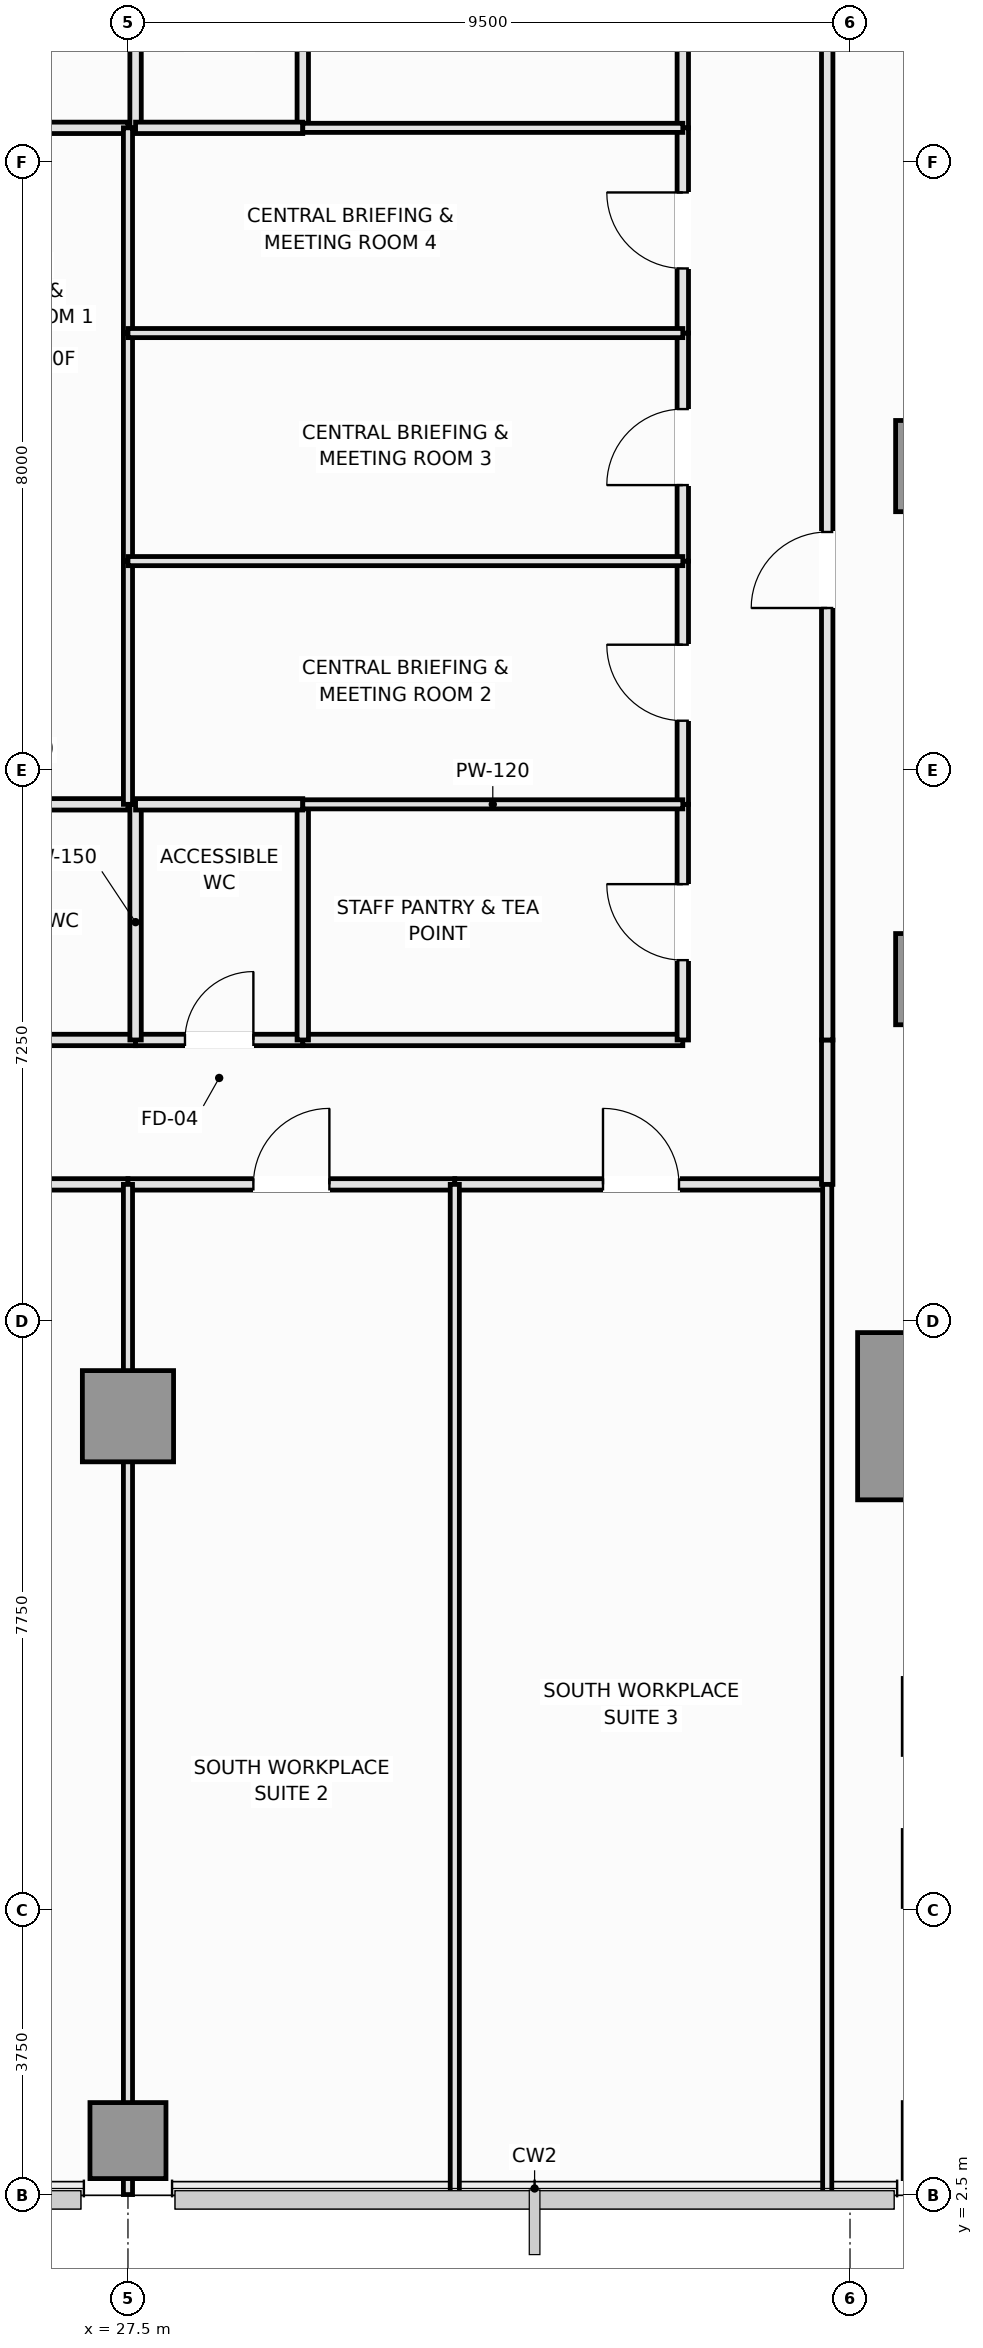
"""IFC4 building model, lengths in metres.
Left out: names, types, materials, properties, quantities, classifications, styles, units other than length and angle.
Written with IfcOpenShell. Run it as: python <this file> out.ifc"""

import sys

from ifc_helpers import new_model, si_unit, direction, frame, frame_2d, origin, origin_2d, place, context, subcontext, project, spatial, rectangle, extrude, element, fill, save


model = new_model("IFC4")
c1 = context("Model", 3, precision=1e-05, world=origin(), true_north=direction((0.0, 1.0)))
c2 = subcontext(c1, "Body", "Model", "MODEL_VIEW")
j1 = project(units=[si_unit("LENGTHUNIT", "METRE"), si_unit("PLANEANGLEUNIT", "RADIAN")], contexts=[c1])
p1 = place(None, origin())
s1 = spatial("IfcSite", under=j1, at=p1, CompositionType="ELEMENT")
p2 = place(p1, origin())
s2 = spatial("IfcBuilding", under=s1, at=p2, CompositionType="ELEMENT")
p3 = place(p2, frame((0.0, 0.0, 75.3)))
s3 = spatial("IfcBuildingStorey", under=s2, at=p3, CompositionType="ELEMENT", Elevation=75.3)
p4 = place(p3, frame((38.2, 12.75, 0.0), z_axis=(0.0, 0.0, 1.0), x_axis=(1.0, 0.0, 0.0)))
e1 = element("IfcColumn", 1, at=p4, inside=s3, PredefinedType="COLUMN", context=c2, shape_type="SweptSolid", body=[
    extrude(rectangle(XDim=2.2, YDim=2.2, at=origin_2d()), origin(), (0.0, 0.0, 1.0), 3.55),
])
for number, where, z_axis, x_axis in (
    (2, (27.5, 12.75, 0.0), (0.0, 0.0, 1.0), (1.0, 0.0, 0.0)),
    (3, (38.2, 18.5, 0.0), (0.0, 0.0, 1.0), (1.0, 0.0, 0.0)),
    (4, (38.2, 25.25, 0.0), (0.0, 0.0, 1.0), (1.0, 0.0, 0.0)),
):
    element("IfcColumn", number, at=place(p3, frame(where, z_axis=z_axis, x_axis=x_axis)), inside=s3, PredefinedType="COLUMN", context=c2, shape_type="SweptSolid", body=[
        extrude(rectangle(XDim=1.2, YDim=1.2, at=origin_2d()), origin(), (0.0, 0.0, 1.0), 3.55),
    ])
p5 = place(p3, frame((27.5, 3.22, 0.0), z_axis=(0.0, 0.0, 1.0), x_axis=(1.0, 0.0, 0.0)))
e5 = element("IfcColumn", 5, at=p5, inside=s3, PredefinedType="COLUMN", context=c2, shape_type="SweptSolid", body=[
    extrude(rectangle(XDim=1.0, YDim=1.0, at=origin_2d()), origin(), (0.0, 0.0, 1.0), 3.55),
])
p6 = place(p3, frame((24.45, 17.7, 0.0), z_axis=(0.0, 0.0, 1.0), x_axis=(1.0, 0.0, 0.0)))
e6 = element("IfcWall", 6, at=p6, inside=s3, PredefinedType="PLUMBINGWALL", context=c2, shape_type="SweptSolid", body=[
    extrude(rectangle(XDim=3.15, YDim=0.15, at=frame_2d((1.575, 0.0))), origin(), (0.0, 0.0, 1.0), 3.37),
])
p7 = place(p3, frame((27.6, 17.7, 0.0), z_axis=(0.0, 0.0, 1.0), x_axis=(1.0, 0.0, 0.0)))
e7 = element("IfcWall", 7, at=p7, inside=s3, PredefinedType="PLUMBINGWALL", context=c2, shape_type="SweptSolid", body=[
    extrude(rectangle(XDim=2.2, YDim=0.15, at=frame_2d((1.1, 0.0))), origin(), (0.0, 0.0, 1.0), 3.37),
])
p8 = place(p7, frame((0.65, 0.0, 0.0)))
e8 = element("IfcOpeningElement", 8, at=p8, cuts=e7, PredefinedType="OPENING", context=c2, shape_type="SweptSolid", body=[
    extrude(rectangle(XDim=0.9, YDim=2.1, at=frame_2d((0.45, 1.05))), frame((0.0, 0.085, 0.0), z_axis=(0.0, -1.0, 0.0), x_axis=(1.0, 0.0, 0.0)), (0.0, 0.0, 1.0), 0.17),
])
p9 = place(p3, frame((29.8, 17.7, 0.0), z_axis=(0.0, 0.0, 1.0), x_axis=(1.0, 0.0, 0.0)))
e9 = element("IfcWall", 9, at=p9, inside=s3, PredefinedType="PARTITIONING", context=c2, shape_type="SweptSolid", body=[
    extrude(rectangle(XDim=5.0, YDim=0.15, at=frame_2d((2.5, 0.0))), origin(), (0.0, 0.0, 1.0), 3.37),
])
p10 = place(p3, frame((18.0, 15.8, 0.0), z_axis=(0.0, 0.0, 1.0), x_axis=(1.0, 0.0, 0.0)))
e10 = element("IfcWall", 10, at=p10, inside=s3, PredefinedType="PARTITIONING", context=c2, shape_type="SweptSolid", body=[
    extrude(rectangle(XDim=9.5, YDim=0.15, at=frame_2d((4.75, 0.0))), origin(), (0.0, 0.0, 1.0), 3.37),
])
p11 = place(p10, frame((4.25, 0.0, 0.0)))
e11 = element("IfcOpeningElement", 11, at=p11, cuts=e10, PredefinedType="OPENING", context=c2, shape_type="SweptSolid", body=[
    extrude(rectangle(XDim=1.0, YDim=2.15, at=frame_2d((0.5, 1.075))), frame((0.0, 0.085, 0.0), z_axis=(0.0, -1.0, 0.0), x_axis=(1.0, 0.0, 0.0)), (0.0, 0.0, 1.0), 0.17),
])
p12 = place(p3, frame((27.5, 15.8, 0.0), z_axis=(0.0, 0.0, 1.0), x_axis=(1.0, 0.0, 0.0)))
e12 = element("IfcWall", 12, at=p12, inside=s3, PredefinedType="PARTITIONING", context=c2, shape_type="SweptSolid", body=[
    extrude(rectangle(XDim=4.3, YDim=0.15, at=frame_2d((2.15, 0.0))), origin(), (0.0, 0.0, 1.0), 3.37),
])
p13 = place(p12, frame((1.65, 0.0, 0.0)))
e13 = element("IfcOpeningElement", 13, at=p13, cuts=e12, PredefinedType="OPENING", context=c2, shape_type="SweptSolid", body=[
    extrude(rectangle(XDim=1.0, YDim=2.15, at=frame_2d((0.5, 1.075))), frame((0.0, 0.085, 0.0), z_axis=(0.0, -1.0, 0.0), x_axis=(1.0, 0.0, 0.0)), (0.0, 0.0, 1.0), 0.17),
])
p14 = place(p3, frame((31.8, 15.8, 0.0), z_axis=(0.0, 0.0, 1.0), x_axis=(1.0, 0.0, 0.0)))
e14 = element("IfcWall", 14, at=p14, inside=s3, PredefinedType="PARTITIONING", context=c2, shape_type="SweptSolid", body=[
    extrude(rectangle(XDim=4.9, YDim=0.15, at=frame_2d((2.45, 0.0))), origin(), (0.0, 0.0, 1.0), 3.37),
])
p15 = place(p14, frame((1.95, 0.0, 0.0)))
e15 = element("IfcOpeningElement", 15, at=p15, cuts=e14, PredefinedType="OPENING", context=c2, shape_type="SweptSolid", body=[
    extrude(rectangle(XDim=1.0, YDim=2.15, at=frame_2d((0.5, 1.075))), frame((0.0, 0.085, 0.0), z_axis=(0.0, -1.0, 0.0), x_axis=(1.0, 0.0, 0.0)), (0.0, 0.0, 1.0), 0.17),
])
p16 = place(p3, frame((36.7, 15.8, 0.0), z_axis=(0.0, 0.0, 1.0), x_axis=(0.0, 1.0, 0.0)))
e16 = element("IfcWall", 16, at=p16, inside=s3, PredefinedType="PARTITIONING", context=c2, shape_type="SweptSolid", body=[
    extrude(rectangle(XDim=1.9, YDim=0.15, at=frame_2d((0.95, 0.0))), origin(), (0.0, 0.0, 1.0), 3.37),
])
p17 = place(p3, frame((34.8, 17.7, 0.0), z_axis=(0.0, 0.0, 1.0), x_axis=(0.0, 1.0, 0.0)))
e17 = element("IfcWall", 17, at=p17, inside=s3, PredefinedType="PARTITIONING", context=c2, shape_type="SweptSolid", body=[
    extrude(rectangle(XDim=3.1, YDim=0.15, at=frame_2d((1.55, 0.0))), origin(), (0.0, 0.0, 1.0), 3.37),
])
p18 = place(p17, frame((1.05, 0.0, 0.0)))
e18 = element("IfcOpeningElement", 18, at=p18, cuts=e17, PredefinedType="OPENING", context=c2, shape_type="SweptSolid", body=[
    extrude(rectangle(XDim=1.0, YDim=2.15, at=frame_2d((0.5, 1.075))), frame((0.0, 0.085, 0.0), z_axis=(0.0, -1.0, 0.0), x_axis=(1.0, 0.0, 0.0)), (0.0, 0.0, 1.0), 0.17),
])
p19 = place(p3, frame((34.8, 29.7, 0.0), z_axis=(0.0, 0.0, 1.0), x_axis=(0.0, 1.0, 0.0)))
e19 = element("IfcWall", 19, at=p19, inside=s3, PredefinedType="PARTITIONING", context=c2, shape_type="SweptSolid", body=[
    extrude(rectangle(XDim=3.1, YDim=0.15, at=frame_2d((1.55, 0.0))), origin(), (0.0, 0.0, 1.0), 3.37),
])
p20 = place(p19, frame((1.05, 0.0, 0.0)))
e20 = element("IfcOpeningElement", 20, at=p20, cuts=e19, PredefinedType="OPENING", context=c2, shape_type="SweptSolid", body=[
    extrude(rectangle(XDim=1.0, YDim=2.15, at=frame_2d((0.5, 1.075))), frame((0.0, 0.085, 0.0), z_axis=(0.0, -1.0, 0.0), x_axis=(1.0, 0.0, 0.0)), (0.0, 0.0, 1.0), 0.17),
])
p21 = place(p3, frame((34.8, 20.8, 0.0), z_axis=(0.0, 0.0, 1.0), x_axis=(0.0, 1.0, 0.0)))
e21 = element("IfcWall", 21, at=p21, inside=s3, PredefinedType="PARTITIONING", context=c2, shape_type="SweptSolid", body=[
    extrude(rectangle(XDim=3.2, YDim=0.15, at=frame_2d((1.6, 0.0))), origin(), (0.0, 0.0, 1.0), 3.37),
])
p22 = place(p21, frame((1.1, 0.0, 0.0)))
e22 = element("IfcOpeningElement", 22, at=p22, cuts=e21, PredefinedType="OPENING", context=c2, shape_type="SweptSolid", body=[
    extrude(rectangle(XDim=1.0, YDim=2.15, at=frame_2d((0.5, 1.075))), frame((0.0, 0.085, 0.0), z_axis=(0.0, -1.0, 0.0), x_axis=(1.0, 0.0, 0.0)), (0.0, 0.0, 1.0), 0.17),
])
p23 = place(p3, frame((34.8, 24.0, 0.0), z_axis=(0.0, 0.0, 1.0), x_axis=(0.0, 1.0, 0.0)))
e23 = element("IfcWall", 23, at=p23, inside=s3, PredefinedType="PARTITIONING", context=c2, shape_type="SweptSolid", body=[
    extrude(rectangle(XDim=3.0, YDim=0.15, at=frame_2d((1.5, 0.0))), origin(), (0.0, 0.0, 1.0), 3.37),
])
p24 = place(p23, frame((1.0, 0.0, 0.0)))
e24 = element("IfcOpeningElement", 24, at=p24, cuts=e23, PredefinedType="OPENING", context=c2, shape_type="SweptSolid", body=[
    extrude(rectangle(XDim=1.0, YDim=2.15, at=frame_2d((0.5, 1.075))), frame((0.0, 0.085, 0.0), z_axis=(0.0, -1.0, 0.0), x_axis=(1.0, 0.0, 0.0)), (0.0, 0.0, 1.0), 0.17),
])
p25 = place(p3, frame((34.8, 27.0, 0.0), z_axis=(0.0, 0.0, 1.0), x_axis=(0.0, 1.0, 0.0)))
e25 = element("IfcWall", 25, at=p25, inside=s3, PredefinedType="PARTITIONING", context=c2, shape_type="SweptSolid", body=[
    extrude(rectangle(XDim=2.7, YDim=0.15, at=frame_2d((1.35, 0.0))), origin(), (0.0, 0.0, 1.0), 3.37),
])
p26 = place(p25, frame((0.85, 0.0, 0.0)))
e26 = element("IfcOpeningElement", 26, at=p26, cuts=e25, PredefinedType="OPENING", context=c2, shape_type="SweptSolid", body=[
    extrude(rectangle(XDim=1.0, YDim=2.15, at=frame_2d((0.5, 1.075))), frame((0.0, 0.085, 0.0), z_axis=(0.0, -1.0, 0.0), x_axis=(1.0, 0.0, 0.0)), (0.0, 0.0, 1.0), 0.17),
])
p27 = place(p3, frame((36.7, 17.7, 0.0), z_axis=(0.0, 0.0, 1.0), x_axis=(0.0, 1.0, 0.0)))
e27 = element("IfcWall", 27, at=p27, inside=s3, PredefinedType="PARTITIONING", context=c2, shape_type="SweptSolid", body=[
    extrude(rectangle(XDim=14.3, YDim=0.15, at=frame_2d((7.15, 0.0))), origin(), (0.0, 0.0, 1.0), 3.37),
])
p28 = place(p27, frame((5.683, 0.0, 0.0)))
e28 = element("IfcOpeningElement", 28, at=p28, cuts=e27, PredefinedType="OPENING", context=c2, shape_type="SweptSolid", body=[
    extrude(rectangle(XDim=1.0, YDim=2.15, at=frame_2d((0.5, 1.075))), frame((0.0, 0.085, 0.0), z_axis=(0.0, -1.0, 0.0), x_axis=(1.0, 0.0, 0.0)), (0.0, 0.0, 1.0), 0.17),
])
p29 = place(p3, frame((27.6, 17.7, 0.0), z_axis=(0.0, 0.0, 1.0), x_axis=(0.0, 1.0, 0.0)))
e29 = element("IfcWall", 29, at=p29, inside=s3, PredefinedType="PLUMBINGWALL", context=c2, shape_type="SweptSolid", body=[
    extrude(rectangle(XDim=3.1, YDim=0.15, at=frame_2d((1.55, 0.0))), origin(), (0.0, 0.0, 1.0), 3.37),
])
p30 = place(p3, frame((24.45, 20.8, 0.0), z_axis=(0.0, 0.0, 1.0), x_axis=(1.0, 0.0, 0.0)))
e30 = element("IfcWall", 30, at=p30, inside=s3, PredefinedType="PLUMBINGWALL", context=c2, shape_type="SweptSolid", body=[
    extrude(rectangle(XDim=3.05, YDim=0.15, at=frame_2d((1.525, 0.0))), origin(), (0.0, 0.0, 1.0), 3.37),
])
p31 = place(p3, frame((27.6, 29.7, 0.0), z_axis=(0.0, 0.0, 1.0), x_axis=(0.0, 1.0, 0.0)))
e31 = element("IfcWall", 31, at=p31, inside=s3, PredefinedType="PLUMBINGWALL", context=c2, shape_type="SweptSolid", body=[
    extrude(rectangle(XDim=3.1, YDim=0.15, at=frame_2d((1.55, 0.0))), origin(), (0.0, 0.0, 1.0), 3.37),
])
p32 = place(p3, frame((24.45, 29.7, 0.0), z_axis=(0.0, 0.0, 1.0), x_axis=(1.0, 0.0, 0.0)))
e32 = element("IfcWall", 32, at=p32, inside=s3, PredefinedType="PLUMBINGWALL", context=c2, shape_type="SweptSolid", body=[
    extrude(rectangle(XDim=3.05, YDim=0.15, at=frame_2d((1.525, 0.0))), origin(), (0.0, 0.0, 1.0), 3.37),
])
p33 = place(p3, frame((29.8, 17.7, 0.0), z_axis=(0.0, 0.0, 1.0), x_axis=(0.0, 1.0, 0.0)))
e33 = element("IfcWall", 33, at=p33, inside=s3, PredefinedType="PLUMBINGWALL", context=c2, shape_type="SweptSolid", body=[
    extrude(rectangle(XDim=3.1, YDim=0.15, at=frame_2d((1.55, 0.0))), origin(), (0.0, 0.0, 1.0), 3.37),
])
p34 = place(p3, frame((27.6, 20.8, 0.0), z_axis=(0.0, 0.0, 1.0), x_axis=(1.0, 0.0, 0.0)))
e34 = element("IfcWall", 34, at=p34, inside=s3, PredefinedType="PLUMBINGWALL", context=c2, shape_type="SweptSolid", body=[
    extrude(rectangle(XDim=2.2, YDim=0.15, at=frame_2d((1.1, 0.0))), origin(), (0.0, 0.0, 1.0), 3.37),
])
p35 = place(p3, frame((29.8, 29.7, 0.0), z_axis=(0.0, 0.0, 1.0), x_axis=(0.0, 1.0, 0.0)))
e35 = element("IfcWall", 35, at=p35, inside=s3, PredefinedType="PLUMBINGWALL", context=c2, shape_type="SweptSolid", body=[
    extrude(rectangle(XDim=3.1, YDim=0.15, at=frame_2d((1.55, 0.0))), origin(), (0.0, 0.0, 1.0), 3.37),
])
p36 = place(p3, frame((27.6, 29.7, 0.0), z_axis=(0.0, 0.0, 1.0), x_axis=(1.0, 0.0, 0.0)))
e36 = element("IfcWall", 36, at=p36, inside=s3, PredefinedType="PLUMBINGWALL", context=c2, shape_type="SweptSolid", body=[
    extrude(rectangle(XDim=2.2, YDim=0.15, at=frame_2d((1.1, 0.0))), origin(), (0.0, 0.0, 1.0), 3.37),
])
for number, where, z_axis, x_axis in (
    (37, (29.8, 20.8, 0.0), (0.0, 0.0, 1.0), (1.0, 0.0, 0.0)),
    (38, (29.8, 29.7, 0.0), (0.0, 0.0, 1.0), (1.0, 0.0, 0.0)),
):
    element("IfcWall", number, at=place(p3, frame(where, z_axis=z_axis, x_axis=x_axis)), inside=s3, PredefinedType="PARTITIONING", context=c2, shape_type="SweptSolid", body=[
        extrude(rectangle(XDim=5.0, YDim=0.12, at=frame_2d((2.5, 0.0))), origin(), (0.0, 0.0, 1.0), 3.37),
    ])
p37 = place(p3, frame((27.5, 20.8, 0.0), z_axis=(0.0, 0.0, 1.0), x_axis=(0.0, 1.0, 0.0)))
e39 = element("IfcWall", 39, at=p37, inside=s3, PredefinedType="PARTITIONING", context=c2, shape_type="SweptSolid", body=[
    extrude(rectangle(XDim=3.2, YDim=0.12, at=frame_2d((1.6, 0.0))), origin(), (0.0, 0.0, 1.0), 3.37),
])
p38 = place(p3, frame((27.5, 24.0, 0.0), z_axis=(0.0, 0.0, 1.0), x_axis=(0.0, 1.0, 0.0)))
e40 = element("IfcWall", 40, at=p38, inside=s3, PredefinedType="PARTITIONING", context=c2, shape_type="SweptSolid", body=[
    extrude(rectangle(XDim=3.0, YDim=0.12, at=frame_2d((1.5, 0.0))), origin(), (0.0, 0.0, 1.0), 3.37),
])
p39 = place(p3, frame((27.5, 27.0, 0.0), z_axis=(0.0, 0.0, 1.0), x_axis=(0.0, 1.0, 0.0)))
e41 = element("IfcWall", 41, at=p39, inside=s3, PredefinedType="PARTITIONING", context=c2, shape_type="SweptSolid", body=[
    extrude(rectangle(XDim=2.7, YDim=0.12, at=frame_2d((1.35, 0.0))), origin(), (0.0, 0.0, 1.0), 3.37),
])
for number, where, z_axis, x_axis in (
    (42, (27.5, 24.0, 0.0), (0.0, 0.0, 1.0), (1.0, 0.0, 0.0)),
    (43, (27.5, 27.0, 0.0), (0.0, 0.0, 1.0), (1.0, 0.0, 0.0)),
):
    element("IfcWall", number, at=place(p3, frame(where, z_axis=z_axis, x_axis=x_axis)), inside=s3, PredefinedType="PARTITIONING", context=c2, shape_type="SweptSolid", body=[
        extrude(rectangle(XDim=7.3, YDim=0.12, at=frame_2d((3.65, 0.0))), origin(), (0.0, 0.0, 1.0), 3.37),
    ])
p40 = place(p3, frame((27.5, 2.51, 0.0), z_axis=(0.0, 0.0, 1.0), x_axis=(0.0, 1.0, 0.0)))
e44 = element("IfcWall", 44, at=p40, inside=s3, PredefinedType="PARTITIONING", context=c2, shape_type="SweptSolid", body=[
    extrude(rectangle(XDim=13.29, YDim=0.12, at=frame_2d((6.645, 0.0))), origin(), (0.0, 0.0, 1.0), 2.82),
])
for number, where, z_axis, x_axis in (
    (45, (31.8, 2.51, 0.0), (0.0, 0.0, 1.0), (0.0, 1.0, 0.0)),
    (46, (36.7, 2.51, 0.0), (0.0, 0.0, 1.0), (0.0, 1.0, 0.0)),
):
    element("IfcWall", number, at=place(p3, frame(where, z_axis=z_axis, x_axis=x_axis)), inside=s3, PredefinedType="PARTITIONING", context=c2, shape_type="SweptSolid", body=[
        extrude(rectangle(XDim=13.29, YDim=0.12, at=frame_2d((6.645, 0.0))), origin(), (0.0, 0.0, 1.0), 3.37),
    ])
p41 = place(p8, origin())
e47 = element("IfcDoor", 47, at=p41, inside=s3, OperationType="SINGLE_SWING_RIGHT", PredefinedType="DOOR", context=c2, shape_type="SweptSolid", body=[
    extrude(rectangle(XDim=0.9, YDim=2.1, at=frame_2d((0.45, 1.05))), frame((0.0, 0.025, 0.0), z_axis=(0.0, -1.0, 0.0), x_axis=(1.0, 0.0, 0.0)), (0.0, 0.0, 1.0), 0.05),
])
fill(e8, e47)
p42 = place(p13, origin())
e48 = element("IfcDoor", 48, at=p42, inside=s3, OperationType="SINGLE_SWING_RIGHT", PredefinedType="DOOR", context=c2, shape_type="SweptSolid", body=[
    extrude(rectangle(XDim=1.0, YDim=2.15, at=frame_2d((0.5, 1.075))), frame((0.0, 0.025, 0.0), z_axis=(0.0, -1.0, 0.0), x_axis=(1.0, 0.0, 0.0)), (0.0, 0.0, 1.0), 0.05),
])
fill(e13, e48)
p43 = place(p15, origin())
e49 = element("IfcDoor", 49, at=p43, inside=s3, OperationType="SINGLE_SWING_LEFT", PredefinedType="DOOR", context=c2, shape_type="SweptSolid", body=[
    extrude(rectangle(XDim=1.0, YDim=2.15, at=frame_2d((0.5, 1.075))), frame((0.0, 0.025, 0.0), z_axis=(0.0, -1.0, 0.0), x_axis=(1.0, 0.0, 0.0)), (0.0, 0.0, 1.0), 0.05),
])
fill(e15, e49)
p44 = place(p18, origin())
e50 = element("IfcDoor", 50, at=p44, inside=s3, OperationType="SINGLE_SWING_RIGHT", PredefinedType="DOOR", context=c2, shape_type="SweptSolid", body=[
    extrude(rectangle(XDim=1.0, YDim=2.15, at=frame_2d((0.5, 1.075))), frame((0.0, 0.025, 0.0), z_axis=(0.0, -1.0, 0.0), x_axis=(1.0, 0.0, 0.0)), (0.0, 0.0, 1.0), 0.05),
])
fill(e18, e50)
p45 = place(p22, origin())
e51 = element("IfcDoor", 51, at=p45, inside=s3, OperationType="SINGLE_SWING_RIGHT", PredefinedType="DOOR", context=c2, shape_type="SweptSolid", body=[
    extrude(rectangle(XDim=1.0, YDim=2.15, at=frame_2d((0.5, 1.075))), frame((0.0, 0.025, 0.0), z_axis=(0.0, -1.0, 0.0), x_axis=(1.0, 0.0, 0.0)), (0.0, 0.0, 1.0), 0.05),
])
fill(e22, e51)
p46 = place(p24, origin())
e52 = element("IfcDoor", 52, at=p46, inside=s3, OperationType="SINGLE_SWING_LEFT", PredefinedType="DOOR", context=c2, shape_type="SweptSolid", body=[
    extrude(rectangle(XDim=1.0, YDim=2.15, at=frame_2d((0.5, 1.075))), frame((0.0, 0.025, 0.0), z_axis=(0.0, -1.0, 0.0), x_axis=(1.0, 0.0, 0.0)), (0.0, 0.0, 1.0), 0.05),
])
fill(e24, e52)
p47 = place(p26, origin())
e53 = element("IfcDoor", 53, at=p47, inside=s3, OperationType="SINGLE_SWING_RIGHT", PredefinedType="DOOR", context=c2, shape_type="SweptSolid", body=[
    extrude(rectangle(XDim=1.0, YDim=2.15, at=frame_2d((0.5, 1.075))), frame((0.0, 0.025, 0.0), z_axis=(0.0, -1.0, 0.0), x_axis=(1.0, 0.0, 0.0)), (0.0, 0.0, 1.0), 0.05),
])
fill(e26, e53)
p48 = place(p28, origin())
e54 = element("IfcDoor", 54, at=p48, inside=s3, OperationType="SINGLE_SWING_LEFT", PredefinedType="DOOR", context=c2, shape_type="SweptSolid", body=[
    extrude(rectangle(XDim=1.0, YDim=2.15, at=frame_2d((0.5, 1.075))), frame((0.0, 0.025, 0.0), z_axis=(0.0, -1.0, 0.0), x_axis=(1.0, 0.0, 0.0)), (0.0, 0.0, 1.0), 0.05),
])
fill(e28, e54)
save(model, sys.argv[1])
